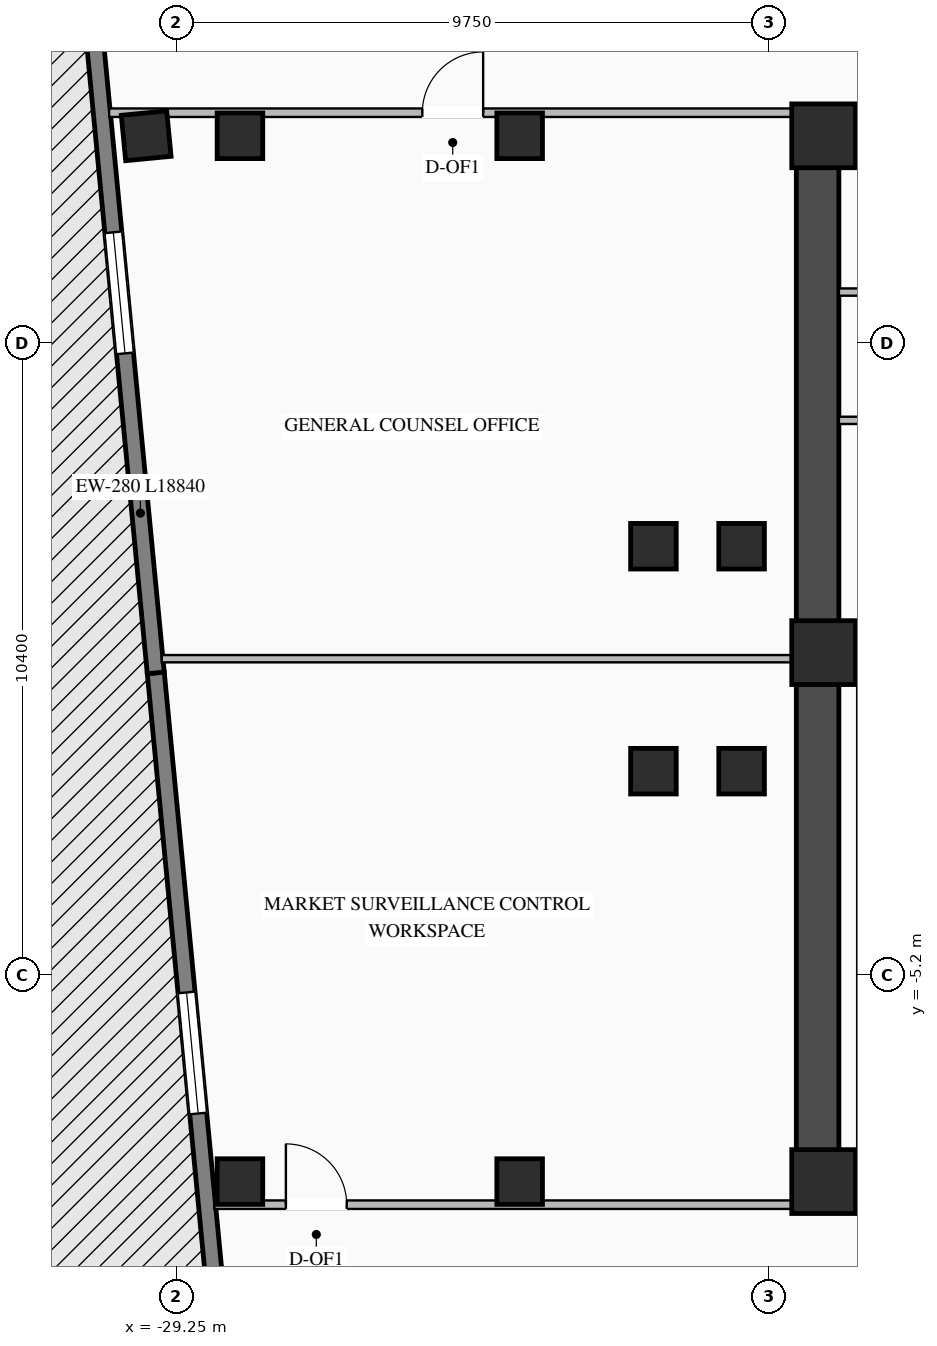
"""IFC4 building model, lengths in metres.
Left out: names, types, materials, properties, quantities, classifications, styles, units other than length and angle.
Written with IfcOpenShell. Run it as: python <this file> out.ifc"""

import sys

from ifc_helpers import new_model, si_unit, direction, frame, frame_2d, origin, origin_2d, place, context, subcontext, project, spatial, rectangle, i_section, extrude, element, fill, save


model = new_model("IFC4")
c1 = context("Model", 3, precision=1e-05, world=origin(), true_north=direction((0.0, 1.0)))
c2 = subcontext(c1, "Body", "Model", "MODEL_VIEW")
j1 = project(units=[si_unit("LENGTHUNIT", "METRE"), si_unit("PLANEANGLEUNIT", "RADIAN")], contexts=[c1])
p1 = place(None, origin())
s1 = spatial("IfcSite", under=j1, at=p1, CompositionType="ELEMENT")
p2 = place(p1, origin())
s2 = spatial("IfcBuilding", under=s1, at=p2, CompositionType="ELEMENT")
p3 = place(p2, frame((0.0, 0.0, 70.0)))
s3 = spatial("IfcBuildingStorey", under=s2, at=p3, CompositionType="ELEMENT", Elevation=70.0)
p4 = place(p3, frame((-19.05, -8.7, 0.0), z_axis=(0.0, 0.0, 1.0), x_axis=(1.0, 0.0, 0.0)))
e1 = element("IfcWall", 1, at=p4, inside=s3, PredefinedType="SHEAR", context=c2, shape_type="SweptSolid", body=[
    extrude(rectangle(XDim=10.25, YDim=0.7, at=frame_2d((5.125, 0.0))), origin(), (0.0, 0.0, 1.0), 4.02),
])
p5 = place(p3, frame((-19.05, 8.7, 0.0), z_axis=(0.0, 0.0, 1.0), x_axis=(1.0, 0.0, 0.0)))
e2 = element("IfcWall", 2, at=p5, inside=s3, PredefinedType="SHEAR", context=c2, shape_type="SweptSolid", body=[
    extrude(rectangle(XDim=10.25, YDim=0.7, at=frame_2d((5.125, 0.0))), origin(), (0.0, 0.0, 1.0), 4.02),
])
p6 = place(p5, frame((5.6, 0.0, 0.0)))
e3 = element("IfcOpeningElement", 3, at=p6, cuts=e2, PredefinedType="OPENING", context=c2, shape_type="SweptSolid", body=[
    extrude(rectangle(XDim=1.4, YDim=2.05, at=frame_2d((0.7, 1.025))), frame((0.0, 0.36, 0.0), z_axis=(0.0, -1.0, 0.0), x_axis=(1.0, 0.0, 0.0)), (0.0, 0.0, 1.0), 0.72),
])
p7 = place(p3, frame((-18.7, -8.35, 0.0), z_axis=(0.0, 0.0, 1.0), x_axis=(0.0, 1.0, 0.0)))
e4 = element("IfcWall", 4, at=p7, inside=s3, PredefinedType="SHEAR", context=c2, shape_type="SweptSolid", body=[
    extrude(rectangle(XDim=16.7, YDim=0.7, at=frame_2d((8.35, 0.0))), origin(), (0.0, 0.0, 1.0), 4.02),
])
for number, where, z_axis, x_axis in (
    (5, (-18.6, -8.6, 0.0), (0.0, 0.0, 1.0), (1.0, 0.0, 0.0)),
    (6, (-18.6, 0.1, 0.0), (0.0, 0.0, 1.0), (1.0, 0.0, 0.0)),
    (7, (-18.6, 8.6, 0.0), (0.0, 0.0, 1.0), (1.0, 0.0, 0.0)),
):
    element("IfcColumn", number, at=place(p3, frame(where, z_axis=z_axis, x_axis=x_axis)), inside=s3, PredefinedType="COLUMN", context=c2, shape_type="SweptSolid", body=[
        extrude(rectangle(XDim=1.05, YDim=1.05, at=origin_2d()), origin(), (0.0, 0.0, 1.0), 4.2),
    ])
for number, where, z_axis, x_axis in (
    (8, (-21.4, -1.85, 0.0), (0.0, 0.0, 1.0), (1.0, 0.0, 0.0)),
    (9, (-21.4, 1.85, 0.0), (0.0, 0.0, 1.0), (1.0, 0.0, 0.0)),
    (10, (-19.95, -1.85, 0.0), (0.0, 0.0, 1.0), (1.0, 0.0, 0.0)),
    (11, (-19.95, 1.85, 0.0), (0.0, 0.0, 1.0), (1.0, 0.0, 0.0)),
    (12, (-23.6, -8.6, 0.0), (0.0, 0.0, 1.0), (1.0, 0.0, 0.0)),
    (13, (-23.6, 8.6, 0.0), (0.0, 0.0, 1.0), (1.0, 0.0, 0.0)),
    (14, (-28.2, -8.6, 0.0), (0.0, 0.0, 1.0), (1.0, 0.0, 0.0)),
    (15, (-28.2, 8.6, 0.0), (0.0, 0.0, 1.0), (1.0, 0.0, 0.0)),
):
    element("IfcColumn", number, at=place(p3, frame(where, z_axis=z_axis, x_axis=x_axis)), inside=s3, PredefinedType="COLUMN", context=c2, shape_type="SweptSolid", body=[
        extrude(i_section(OverallWidth=0.75, OverallDepth=0.75, WebThickness=0.03, FlangeThickness=0.044, at=origin_2d()), origin(), (0.0, 0.0, 1.0), 4.2),
    ])
p8 = place(p3, frame((-29.742, 8.6, -0.28), z_axis=(0.0, 0.0, 1.0), x_axis=(0.995396198367, 0.09584575252, 0.0)))
e16 = element("IfcColumn", 16, at=p8, inside=s3, PredefinedType="COLUMN", context=c2, shape_type="SweptSolid", body=[
    extrude(i_section(OverallWidth=0.75, OverallDepth=0.75, WebThickness=0.03, FlangeThickness=0.044, at=origin_2d()), origin(), (0.0, 0.0, 1.0), 4.48),
])
p9 = place(p3, frame((-27.779, -18.987, 0.0), z_axis=(0.0, 0.0, 1.0), x_axis=(-0.095842534142, 0.995396508256, 0.0)))
e17 = element("IfcWall", 17, at=p9, inside=s3, PredefinedType="STANDARD", context=c2, shape_type="SweptSolid", body=[
    extrude(rectangle(XDim=18.84, YDim=0.28, at=frame_2d((9.42, 0.0))), origin(), (0.0, 0.0, 1.0), 4.0),
])
p10 = place(p9, frame((5.28, 0.0, 0.76)))
e18 = element("IfcOpeningElement", 18, at=p10, cuts=e17, PredefinedType="OPENING", context=c2, shape_type="SweptSolid", body=[
    extrude(rectangle(XDim=2.0, YDim=2.05, at=frame_2d((1.0, 1.025))), frame((0.0, 0.15, 0.0), z_axis=(0.0, -1.0, 0.0), x_axis=(1.0, 0.0, 0.0)), (0.0, 0.0, 1.0), 0.3),
])
p11 = place(p9, frame((11.56, 0.0, 0.76)))
e19 = element("IfcOpeningElement", 19, at=p11, cuts=e17, PredefinedType="OPENING", context=c2, shape_type="SweptSolid", body=[
    extrude(rectangle(XDim=2.0, YDim=2.05, at=frame_2d((1.0, 1.025))), frame((0.0, 0.15, 0.0), z_axis=(0.0, -1.0, 0.0), x_axis=(1.0, 0.0, 0.0)), (0.0, 0.0, 1.0), 0.3),
])
p12 = place(p3, frame((-29.585, -0.234, 0.0), z_axis=(0.0, 0.0, 1.0), x_axis=(-0.095841297881, 0.99539662729, 0.0)))
e20 = element("IfcWall", 20, at=p12, inside=s3, PredefinedType="STANDARD", context=c2, shape_type="SweptSolid", body=[
    extrude(rectangle(XDim=18.84, YDim=0.28, at=frame_2d((9.42, 0.0))), origin(), (0.0, 0.0, 1.0), 4.0),
])
p13 = place(p12, frame((5.28, 0.0, 0.76)))
e21 = element("IfcOpeningElement", 21, at=p13, cuts=e20, PredefinedType="OPENING", context=c2, shape_type="SweptSolid", body=[
    extrude(rectangle(XDim=2.0, YDim=2.05, at=frame_2d((1.0, 1.025))), frame((0.0, 0.15, 0.0), z_axis=(0.0, -1.0, 0.0), x_axis=(1.0, 0.0, 0.0)), (0.0, 0.0, 1.0), 0.3),
])
p14 = place(p12, frame((12.11, 0.0, 0.76)))
e22 = element("IfcOpeningElement", 22, at=p14, cuts=e20, PredefinedType="OPENING", context=c2, shape_type="SweptSolid", body=[
    extrude(rectangle(XDim=2.0, YDim=2.05, at=frame_2d((1.0, 1.025))), frame((0.0, 0.15, 0.0), z_axis=(0.0, -1.0, 0.0), x_axis=(1.0, 0.0, 0.0)), (0.0, 0.0, 1.0), 0.3),
])
p15 = place(p3, frame((-18.35, 3.92, 0.0), z_axis=(0.0, 0.0, 1.0), x_axis=(1.0, 0.0, 0.0)))
e23 = element("IfcWall", 23, at=p15, inside=s3, PredefinedType="STANDARD", context=c2, shape_type="SweptSolid", body=[
    extrude(rectangle(XDim=4.45, YDim=0.12, at=frame_2d((2.225, 0.0))), origin(), (0.0, 0.0, 1.0), 4.0),
])
p16 = place(p3, frame((-18.35, 6.03, 0.0), z_axis=(0.0, 0.0, 1.0), x_axis=(1.0, 0.0, 0.0)))
e24 = element("IfcWall", 24, at=p16, inside=s3, PredefinedType="STANDARD", context=c2, shape_type="SweptSolid", body=[
    extrude(rectangle(XDim=2.2, YDim=0.12, at=frame_2d((1.1, 0.0))), origin(), (0.0, 0.0, 1.0), 4.0),
])
p17 = place(p3, frame((-30.351, 8.98, 0.0), z_axis=(0.0, 0.0, 1.0), x_axis=(1.0, 0.0, 0.0)))
e25 = element("IfcWall", 25, at=p17, inside=s3, PredefinedType="STANDARD", context=c2, shape_type="SweptSolid", body=[
    extrude(rectangle(XDim=11.301, YDim=0.14, at=frame_2d((5.651, 0.0))), origin(), (0.0, 0.0, 1.0), 4.0),
])
p18 = place(p17, frame((5.151, 0.0, 0.0)))
e26 = element("IfcOpeningElement", 26, at=p18, cuts=e25, PredefinedType="OPENING", context=c2, shape_type="SweptSolid", body=[
    extrude(rectangle(XDim=1.0, YDim=2.08, at=frame_2d((0.5, 1.04))), frame((0.0, 0.08, 0.0), z_axis=(0.0, -1.0, 0.0), x_axis=(1.0, 0.0, 0.0)), (0.0, 0.0, 1.0), 0.16),
])
p19 = place(p3, frame((-28.622, -8.98, 0.0), z_axis=(0.0, 0.0, 1.0), x_axis=(1.0, 0.0, 0.0)))
e27 = element("IfcWall", 27, at=p19, inside=s3, PredefinedType="STANDARD", context=c2, shape_type="SweptSolid", body=[
    extrude(rectangle(XDim=9.572, YDim=0.14, at=frame_2d((4.786, 0.0))), origin(), (0.0, 0.0, 1.0), 4.0),
])
p20 = place(p19, frame((1.177, 0.0, 0.0)))
e28 = element("IfcOpeningElement", 28, at=p20, cuts=e27, PredefinedType="OPENING", context=c2, shape_type="SweptSolid", body=[
    extrude(rectangle(XDim=1.0, YDim=2.08, at=frame_2d((0.5, 1.04))), frame((0.0, 0.08, 0.0), z_axis=(0.0, -1.0, 0.0), x_axis=(1.0, 0.0, 0.0)), (0.0, 0.0, 1.0), 0.16),
])
p21 = place(p3, frame((-29.487, 0.0, 0.0), z_axis=(0.0, 0.0, 1.0), x_axis=(1.0, 0.0, 0.0)))
e29 = element("IfcWall", 29, at=p21, inside=s3, PredefinedType="STANDARD", context=c2, shape_type="SweptSolid", body=[
    extrude(rectangle(XDim=10.437, YDim=0.12, at=frame_2d((5.218, 0.0))), origin(), (0.0, 0.0, 1.0), 3.495),
])
p22 = place(p11, origin())
e30 = element("IfcWindow", 30, at=p22, inside=s3, PartitioningType="DOUBLE_PANEL_VERTICAL", PredefinedType="WINDOW", context=c2, shape_type="SweptSolid", body=[
    extrude(rectangle(XDim=2.0, YDim=2.05, at=frame_2d((1.0, 1.025))), frame((0.0, 0.03, 0.0), z_axis=(0.0, -1.0, 0.0), x_axis=(1.0, 0.0, 0.0)), (0.0, 0.0, 1.0), 0.06),
])
fill(e19, e30)
p23 = place(p13, origin())
e31 = element("IfcWindow", 31, at=p23, inside=s3, PartitioningType="DOUBLE_PANEL_VERTICAL", PredefinedType="WINDOW", context=c2, shape_type="SweptSolid", body=[
    extrude(rectangle(XDim=2.0, YDim=2.05, at=frame_2d((1.0, 1.025))), frame((0.0, 0.03, 0.0), z_axis=(0.0, -1.0, 0.0), x_axis=(1.0, 0.0, 0.0)), (0.0, 0.0, 1.0), 0.06),
])
fill(e21, e31)
p24 = place(p18, origin())
e32 = element("IfcDoor", 32, at=p24, inside=s3, OperationType="SINGLE_SWING_RIGHT", PredefinedType="DOOR", context=c2, shape_type="SweptSolid", body=[
    extrude(rectangle(XDim=1.0, YDim=2.08, at=frame_2d((0.5, 1.04))), frame((0.0, 0.025, 0.0), z_axis=(0.0, -1.0, 0.0), x_axis=(1.0, 0.0, 0.0)), (0.0, 0.0, 1.0), 0.05),
])
fill(e26, e32)
p25 = place(p20, origin())
e33 = element("IfcDoor", 33, at=p25, inside=s3, OperationType="SINGLE_SWING_LEFT", PredefinedType="DOOR", context=c2, shape_type="SweptSolid", body=[
    extrude(rectangle(XDim=1.0, YDim=2.08, at=frame_2d((0.5, 1.04))), frame((0.0, 0.025, 0.0), z_axis=(0.0, -1.0, 0.0), x_axis=(1.0, 0.0, 0.0)), (0.0, 0.0, 1.0), 0.05),
])
fill(e28, e33)
save(model, sys.argv[1])
